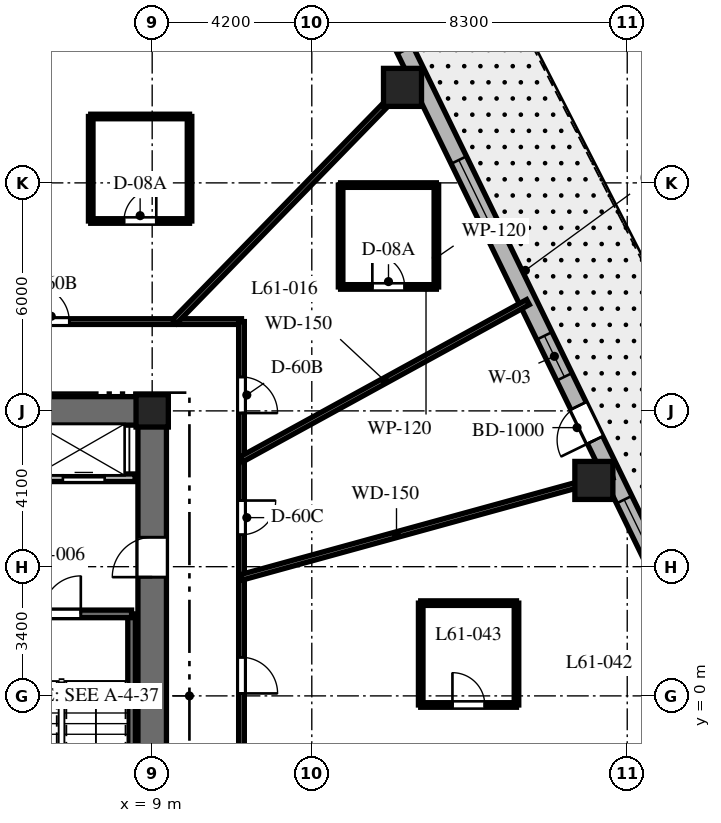
"""IFC4 building model, lengths in metres.
Left out: names, types, materials, properties, quantities, classifications, styles, units other than length and angle.
Written with IfcOpenShell. Run it as: python <this file> out.ifc"""

import sys

from ifc_helpers import new_model, si_unit, direction, frame, frame_2d, origin, origin_2d, place, context, subcontext, project, spatial, rectangle, extrude, element, fill, save


model = new_model("IFC4")
c1 = context("Model", 3, precision=1e-05, world=origin(), true_north=direction((0.0, 1.0)))
c2 = subcontext(c1, "Body", "Model", "MODEL_VIEW")
j1 = project(units=[si_unit("LENGTHUNIT", "METRE"), si_unit("PLANEANGLEUNIT", "RADIAN")], contexts=[c1])
p1 = place(None, origin())
s1 = spatial("IfcSite", under=j1, at=p1, CompositionType="ELEMENT")
p2 = place(p1, origin())
s2 = spatial("IfcBuilding", under=s1, at=p2, CompositionType="ELEMENT")
p3 = place(p2, frame((0.0, 0.0, 244.5)))
s3 = spatial("IfcBuildingStorey", under=s2, at=p3, CompositionType="ELEMENT", Elevation=244.5)
p4 = place(p3, frame((1.85, 7.5, 0.0), z_axis=(0.0, 0.0, 1.0), x_axis=(1.0, 0.0, 0.0)))
e1 = element("IfcWall", 1, at=p4, inside=s3, PredefinedType="SHEAR", context=c2, shape_type="SweptSolid", body=[
    extrude(rectangle(XDim=7.525, YDim=0.75, at=frame_2d((3.762, 0.0))), origin(), (0.0, 0.0, 1.0), 3.8),
])
p5 = place(p3, frame((9.0, -7.125, 0.0), z_axis=(0.0, 0.0, 1.0), x_axis=(0.0, 1.0, 0.0)))
e2 = element("IfcWall", 2, at=p5, inside=s3, PredefinedType="SHEAR", context=c2, shape_type="SweptSolid", body=[
    extrude(rectangle(XDim=14.25, YDim=0.75, at=frame_2d((7.125, 0.0))), origin(), (0.0, 0.0, 1.0), 3.8),
])
p6 = place(p5, frame((10.25, 0.0, 0.0)))
e3 = element("IfcOpeningElement", 3, at=p6, cuts=e2, PredefinedType="OPENING", context=c2, shape_type="SweptSolid", body=[
    extrude(rectangle(XDim=1.05, YDim=2.15, at=frame_2d((0.525, 1.075))), frame((0.0, 0.385, 0.0), z_axis=(0.0, -1.0, 0.0), x_axis=(1.0, 0.0, 0.0)), (0.0, 0.0, 1.0), 0.77),
])
p7 = place(p3, frame((8.458, -6.985, 0.0), z_axis=(0.0, 0.0, 1.0), x_axis=(0.0, 1.0, 0.0)))
e4 = element("IfcWall", 4, at=p7, inside=s3, PredefinedType="SHEAR", context=c2, shape_type="SweptSolid", body=[
    extrude(rectangle(XDim=9.143, YDim=0.2, at=frame_2d((4.572, 0.0))), origin(), (0.0, 0.0, 1.0), 3.8),
])
p8 = place(p3, frame((4.772, 2.158, 0.0), z_axis=(0.0, 0.0, 1.0), x_axis=(1.0, 0.0, 0.0)))
e5 = element("IfcWall", 5, at=p8, inside=s3, PredefinedType="SHEAR", context=c2, shape_type="SweptSolid", body=[
    extrude(rectangle(XDim=3.686, YDim=0.2, at=frame_2d((1.843, 0.0))), origin(), (0.0, 0.0, 1.0), 3.8),
])
p9 = place(p8, frame((1.35, 0.0, 0.0)))
e6 = element("IfcOpeningElement", 6, at=p9, cuts=e5, PredefinedType="OPENING", context=c2, shape_type="SweptSolid", body=[
    extrude(rectangle(XDim=1.0, YDim=2.15, at=frame_2d((0.5, 1.075))), frame((0.0, 0.11, 0.0), z_axis=(0.0, -1.0, 0.0), x_axis=(1.0, 0.0, 0.0)), (0.0, 0.0, 1.0), 0.22),
])
p10 = place(p3, frame((9.0, 7.5, 0.0), z_axis=(0.0, 0.0, 1.0), x_axis=(1.0, 0.0, 0.0)))
e7 = element("IfcColumn", 7, at=p10, inside=s3, PredefinedType="COLUMN", context=c2, shape_type="SweptSolid", body=[
    extrude(rectangle(XDim=0.85, YDim=0.85, at=origin_2d()), origin(), (0.0, 0.0, 1.0), 3.8),
])
for number, where, z_axis, x_axis in (
    (8, (20.622, 5.67, 0.0), (0.0, 0.0, 1.0), (1.0, 0.0, 0.0)),
    (9, (15.587, 16.013, 0.0), (0.0, 0.0, 1.0), (1.0, 0.0, 0.0)),
):
    element("IfcColumn", number, at=place(p3, frame(where, z_axis=z_axis, x_axis=x_axis)), inside=s3, PredefinedType="COLUMN", context=c2, shape_type="SweptSolid", body=[
        extrude(rectangle(XDim=1.0, YDim=1.0, at=origin_2d()), origin(), (0.0, 0.0, 1.0), 3.8),
    ])
p11 = place(p3, frame((16.324, -19.275, 0.0), z_axis=(0.0, 0.0, 1.0), x_axis=(0.325083142304, 0.945685439557, 0.0)))
e10 = element("IfcWall", 10, at=p11, inside=s3, PredefinedType="SOLIDWALL", context=c2, shape_type="SweptSolid", body=[
    extrude(rectangle(XDim=20.224, YDim=0.45, at=frame_2d((10.112, 0.0))), origin(), (0.0, 0.0, 1.0), 3.5),
])
p12 = place(p11, frame((1.253, 0.0, 0.8)))
e11 = element("IfcOpeningElement", 11, at=p12, cuts=e10, PredefinedType="OPENING", context=c2, shape_type="SweptSolid", body=[
    extrude(rectangle(XDim=1.5, YDim=1.8, at=frame_2d((0.75, 0.9))), frame((0.0, 0.235, 0.0), z_axis=(0.0, -1.0, 0.0), x_axis=(1.0, 0.0, 0.0)), (0.0, 0.0, 1.0), 0.47),
])
p13 = place(p11, frame((6.568, 0.0, 0.8)))
e12 = element("IfcOpeningElement", 12, at=p13, cuts=e10, PredefinedType="OPENING", context=c2, shape_type="SweptSolid", body=[
    extrude(rectangle(XDim=1.5, YDim=1.8, at=frame_2d((0.75, 0.9))), frame((0.0, 0.235, 0.0), z_axis=(0.0, -1.0, 0.0), x_axis=(1.0, 0.0, 0.0)), (0.0, 0.0, 1.0), 0.47),
])
p14 = place(p11, frame((12.25, 0.0, 0.8)))
e13 = element("IfcOpeningElement", 13, at=p14, cuts=e10, PredefinedType="OPENING", context=c2, shape_type="SweptSolid", body=[
    extrude(rectangle(XDim=1.5, YDim=1.8, at=frame_2d((0.75, 0.9))), frame((0.0, 0.235, 0.0), z_axis=(0.0, -1.0, 0.0), x_axis=(1.0, 0.0, 0.0)), (0.0, 0.0, 1.0), 0.47),
])
p15 = place(p11, frame((17.418, 0.0, 0.8)))
e14 = element("IfcOpeningElement", 14, at=p15, cuts=e10, PredefinedType="OPENING", context=c2, shape_type="SweptSolid", body=[
    extrude(rectangle(XDim=1.5, YDim=1.8, at=frame_2d((0.75, 0.9))), frame((0.0, 0.235, 0.0), z_axis=(0.0, -1.0, 0.0), x_axis=(1.0, 0.0, 0.0)), (0.0, 0.0, 1.0), 0.47),
])
p16 = place(p3, frame((22.74, 2.452, 0.0), z_axis=(0.0, 0.0, 1.0), x_axis=(-0.437753424814, 0.899095066755, 0.0)))
e15 = element("IfcWall", 15, at=p16, inside=s3, PredefinedType="SOLIDWALL", context=c2, shape_type="SweptSolid", body=[
    extrude(rectangle(XDim=19.137, YDim=0.45, at=frame_2d((9.569, 0.0))), origin(), (0.0, 0.0, 1.0), 3.5),
])
p17 = place(p16, frame((4.763, 0.0, 0.0)))
e16 = element("IfcOpeningElement", 16, at=p17, cuts=e15, PredefinedType="OPENING", context=c2, shape_type="SweptSolid", body=[
    extrude(rectangle(XDim=1.0, YDim=2.15, at=frame_2d((0.5, 1.075))), frame((0.0, 0.235, 0.0), z_axis=(0.0, -1.0, 0.0), x_axis=(1.0, 0.0, 0.0)), (0.0, 0.0, 1.0), 0.47),
])
p18 = place(p16, frame((6.611, 0.0, 0.8)))
e17 = element("IfcOpeningElement", 17, at=p18, cuts=e15, PredefinedType="OPENING", context=c2, shape_type="SweptSolid", body=[
    extrude(rectangle(XDim=1.2, YDim=1.8, at=frame_2d((0.6, 0.9))), frame((0.0, 0.235, 0.0), z_axis=(0.0, -1.0, 0.0), x_axis=(1.0, 0.0, 0.0)), (0.0, 0.0, 1.0), 0.47),
])
p19 = place(p16, frame((10.856, 0.0, 0.8)))
e18 = element("IfcOpeningElement", 18, at=p19, cuts=e15, PredefinedType="OPENING", context=c2, shape_type="SweptSolid", body=[
    extrude(rectangle(XDim=2.1, YDim=1.85, at=frame_2d((1.05, 0.925))), frame((0.0, 0.235, 0.0), z_axis=(0.0, -1.0, 0.0), x_axis=(1.0, 0.0, 0.0)), (0.0, 0.0, 1.0), 0.47),
])
p20 = place(p16, frame((16.173, 0.0, 0.8)))
e19 = element("IfcOpeningElement", 19, at=p20, cuts=e15, PredefinedType="OPENING", context=c2, shape_type="SweptSolid", body=[
    extrude(rectangle(XDim=2.1, YDim=1.85, at=frame_2d((1.05, 0.925))), frame((0.0, 0.235, 0.0), z_axis=(0.0, -1.0, 0.0), x_axis=(1.0, 0.0, 0.0)), (0.0, 0.0, 1.0), 0.47),
])
p21 = place(p16, frame((0.916, 0.0, 0.8)))
e20 = element("IfcOpeningElement", 20, at=p21, cuts=e15, PredefinedType="OPENING", context=c2, shape_type="SweptSolid", body=[
    extrude(rectangle(XDim=2.1, YDim=1.85, at=frame_2d((1.05, 0.925))), frame((0.0, 0.235, 0.0), z_axis=(0.0, -1.0, 0.0), x_axis=(1.0, 0.0, 0.0)), (0.0, 0.0, 1.0), 0.47),
])
p22 = place(p3, frame((4.5, 5.74, 0.0), z_axis=(0.0, 0.0, 1.0), x_axis=(1.0, 0.0, 0.0)))
e21 = element("IfcWall", 21, at=p22, inside=s3, PredefinedType="PARTITIONING", context=c2, shape_type="SweptSolid", body=[
    extrude(rectangle(XDim=4.05, YDim=0.2, at=frame_2d((2.025, 0.0))), origin(), (0.0, 0.0, 1.0), 3.5),
])
p23 = place(p22, frame((0.3, 0.0, 0.0)))
e22 = element("IfcOpeningElement", 22, at=p23, cuts=e21, PredefinedType="OPENING", context=c2, shape_type="SweptSolid", body=[
    extrude(rectangle(XDim=0.85, YDim=2.03, at=frame_2d((0.425, 1.015))), frame((0.0, 0.11, 0.0), z_axis=(0.0, -1.0, 0.0), x_axis=(1.0, 0.0, 0.0)), (0.0, 0.0, 1.0), 0.22),
])
p24 = place(p22, frame((2.15, 0.0, 0.0)))
e23 = element("IfcOpeningElement", 23, at=p24, cuts=e21, PredefinedType="OPENING", context=c2, shape_type="SweptSolid", body=[
    extrude(rectangle(XDim=1.1, YDim=2.2, at=frame_2d((0.55, 1.1))), frame((0.0, 0.11, 0.0), z_axis=(0.0, -1.0, 0.0), x_axis=(1.0, 0.0, 0.0)), (0.0, 0.0, 1.0), 0.22),
])
p25 = place(p3, frame((0.92, 9.85, 0.0), z_axis=(0.0, 0.0, 1.0), x_axis=(1.0, 0.0, 0.0)))
e24 = element("IfcWall", 24, at=p25, inside=s3, PredefinedType="PARTITIONING", context=c2, shape_type="SweptSolid", body=[
    extrude(rectangle(XDim=10.43, YDim=0.15, at=frame_2d((5.215, 0.0))), origin(), (0.0, 0.0, 1.0), 2.99),
])
p26 = place(p25, frame((4.949, 0.0, 0.0)))
e25 = element("IfcOpeningElement", 25, at=p26, cuts=e24, PredefinedType="OPENING", context=c2, shape_type="SweptSolid", body=[
    extrude(rectangle(XDim=0.95, YDim=2.03, at=frame_2d((0.475, 1.015))), frame((0.0, 0.085, 0.0), z_axis=(0.0, -1.0, 0.0), x_axis=(1.0, 0.0, 0.0)), (0.0, 0.0, 1.0), 0.17),
])
p27 = place(p3, frame((11.35, 9.85, 0.0), z_axis=(0.0, 0.0, 1.0), x_axis=(0.0, -1.0, 0.0)))
e26 = element("IfcWall", 26, at=p27, inside=s3, PredefinedType="PARTITIONING", context=c2, shape_type="SweptSolid", body=[
    extrude(rectangle(XDim=12.4, YDim=0.15, at=frame_2d((6.2, 0.0))), origin(), (0.0, 0.0, 1.0), 2.99),
])
p28 = place(p27, frame((4.709, 0.0, 0.0)))
e27 = element("IfcOpeningElement", 27, at=p28, cuts=e26, PredefinedType="OPENING", context=c2, shape_type="SweptSolid", body=[
    extrude(rectangle(XDim=0.9, YDim=2.03, at=frame_2d((0.45, 1.015))), frame((0.0, 0.085, 0.0), z_axis=(0.0, -1.0, 0.0), x_axis=(1.0, 0.0, 0.0)), (0.0, 0.0, 1.0), 0.17),
])
p29 = place(p27, frame((1.457, 0.0, 0.0)))
e28 = element("IfcOpeningElement", 28, at=p29, cuts=e26, PredefinedType="OPENING", context=c2, shape_type="SweptSolid", body=[
    extrude(rectangle(XDim=0.95, YDim=2.03, at=frame_2d((0.475, 1.015))), frame((0.0, 0.085, 0.0), z_axis=(0.0, -1.0, 0.0), x_axis=(1.0, 0.0, 0.0)), (0.0, 0.0, 1.0), 0.17),
])
p30 = place(p27, frame((8.835, 0.0, 0.0)))
e29 = element("IfcOpeningElement", 29, at=p30, cuts=e26, PredefinedType="OPENING", context=c2, shape_type="SweptSolid", body=[
    extrude(rectangle(XDim=0.95, YDim=2.03, at=frame_2d((0.475, 1.015))), frame((0.0, 0.085, 0.0), z_axis=(0.0, -1.0, 0.0), x_axis=(1.0, 0.0, 0.0)), (0.0, 0.0, 1.0), 0.17),
])
p31 = place(p3, frame((11.35, 3.121, 0.0), z_axis=(0.0, 0.0, 1.0), x_axis=(0.964212793822, 0.265129568758, 0.0)))
e30 = element("IfcWall", 30, at=p31, inside=s3, PredefinedType="PARTITIONING", context=c2, shape_type="SweptSolid", body=[
    extrude(rectangle(XDim=10.12, YDim=0.15, at=frame_2d((5.06, 0.0))), origin(), (0.0, 0.0, 1.0), 2.74),
])
p32 = place(p3, frame((11.35, 6.227, 0.0), z_axis=(0.0, 0.0, 1.0), x_axis=(0.876723190824, 0.480995266786, 0.0)))
e31 = element("IfcWall", 31, at=p32, inside=s3, PredefinedType="PARTITIONING", context=c2, shape_type="SweptSolid", body=[
    extrude(rectangle(XDim=8.598, YDim=0.15, at=frame_2d((4.299, 0.0))), origin(), (0.0, 0.0, 1.0), 2.74),
])
p33 = place(p3, frame((9.588, 9.85, 0.0), z_axis=(0.0, 0.0, 1.0), x_axis=(0.697519469595, 0.716565830567, 0.0)))
e32 = element("IfcWall", 32, at=p33, inside=s3, PredefinedType="PARTITIONING", context=c2, shape_type="SweptSolid", body=[
    extrude(rectangle(XDim=9.126, YDim=0.15, at=frame_2d((4.563, 0.0))), origin(), (0.0, 0.0, 1.0), 2.74),
])
p34 = place(p3, frame((3.004, 9.85, 0.0), z_axis=(0.0, 0.0, 1.0), x_axis=(0.291775760688, 0.956486751333, 0.0)))
e33 = element("IfcWall", 33, at=p34, inside=s3, PredefinedType="PARTITIONING", context=c2, shape_type="SweptSolid", body=[
    extrude(rectangle(XDim=12.258, YDim=0.15, at=frame_2d((6.129, 0.0))), origin(), (0.0, 0.0, 1.0), 2.74),
])
p35 = place(p3, frame((13.958, 10.762, 0.0), z_axis=(0.0, 0.0, 1.0), x_axis=(1.0, 0.0, 0.0)))
e34 = element("IfcWall", 34, at=p35, inside=s3, PredefinedType="PARTITIONING", context=c2, shape_type="SweptSolid", body=[
    extrude(rectangle(XDim=2.52, YDim=0.12, at=frame_2d((1.26, 0.0))), origin(), (0.0, 0.0, 1.0), 3.027),
])
p36 = place(p35, frame((0.835, 0.0, 0.0)))
e35 = element("IfcOpeningElement", 35, at=p36, cuts=e34, PredefinedType="OPENING", context=c2, shape_type="SweptSolid", body=[
    extrude(rectangle(XDim=0.85, YDim=2.03, at=frame_2d((0.425, 1.015))), frame((0.0, 0.07, 0.0), z_axis=(0.0, -1.0, 0.0), x_axis=(1.0, 0.0, 0.0)), (0.0, 0.0, 1.0), 0.14),
])
p37 = place(p3, frame((16.478, 10.762, 0.0), z_axis=(0.0, 0.0, 1.0), x_axis=(0.0, 1.0, 0.0)))
e36 = element("IfcWall", 36, at=p37, inside=s3, PredefinedType="PARTITIONING", context=c2, shape_type="SweptSolid", body=[
    extrude(rectangle(XDim=2.68, YDim=0.12, at=frame_2d((1.34, 0.0))), origin(), (0.0, 0.0, 1.0), 3.5),
])
p38 = place(p3, frame((16.478, 13.442, 0.0), z_axis=(0.0, 0.0, 1.0), x_axis=(-1.0, 0.0, 0.0)))
e37 = element("IfcWall", 37, at=p38, inside=s3, PredefinedType="PARTITIONING", context=c2, shape_type="SweptSolid", body=[
    extrude(rectangle(XDim=2.52, YDim=0.12, at=frame_2d((1.26, 0.0))), origin(), (0.0, 0.0, 1.0), 3.5),
])
p39 = place(p3, frame((13.958, 13.442, 0.0), z_axis=(0.0, 0.0, 1.0), x_axis=(0.0, -1.0, 0.0)))
e38 = element("IfcWall", 38, at=p39, inside=s3, PredefinedType="PARTITIONING", context=c2, shape_type="SweptSolid", body=[
    extrude(rectangle(XDim=2.68, YDim=0.12, at=frame_2d((1.34, 0.0))), origin(), (0.0, 0.0, 1.0), 3.027),
])
p40 = place(p3, frame((7.383, 12.497, 0.0), z_axis=(0.0, 0.0, 1.0), x_axis=(1.0, 0.0, 0.0)))
e39 = element("IfcWall", 39, at=p40, inside=s3, PredefinedType="PARTITIONING", context=c2, shape_type="SweptSolid", body=[
    extrude(rectangle(XDim=2.6, YDim=0.12, at=frame_2d((1.3, 0.0))), origin(), (0.0, 0.0, 1.0), 2.94),
])
p41 = place(p40, frame((0.875, 0.0, 0.0)))
e40 = element("IfcOpeningElement", 40, at=p41, cuts=e39, PredefinedType="OPENING", context=c2, shape_type="SweptSolid", body=[
    extrude(rectangle(XDim=0.85, YDim=2.03, at=frame_2d((0.425, 1.015))), frame((0.0, 0.07, 0.0), z_axis=(0.0, -1.0, 0.0), x_axis=(1.0, 0.0, 0.0)), (0.0, 0.0, 1.0), 0.14),
])
p42 = place(p3, frame((9.983, 12.497, 0.0), z_axis=(0.0, 0.0, 1.0), x_axis=(0.0, 1.0, 0.0)))
e41 = element("IfcWall", 41, at=p42, inside=s3, PredefinedType="PARTITIONING", context=c2, shape_type="SweptSolid", body=[
    extrude(rectangle(XDim=2.75, YDim=0.12, at=frame_2d((1.375, 0.0))), origin(), (0.0, 0.0, 1.0), 3.073),
])
p43 = place(p3, frame((9.983, 15.247, 0.0), z_axis=(0.0, 0.0, 1.0), x_axis=(-1.0, 0.0, 0.0)))
e42 = element("IfcWall", 42, at=p43, inside=s3, PredefinedType="PARTITIONING", context=c2, shape_type="SweptSolid", body=[
    extrude(rectangle(XDim=2.6, YDim=0.12, at=frame_2d((1.3, 0.0))), origin(), (0.0, 0.0, 1.0), 3.073),
])
p44 = place(p3, frame((7.383, 15.247, 0.0), z_axis=(0.0, 0.0, 1.0), x_axis=(0.0, -1.0, 0.0)))
e43 = element("IfcWall", 43, at=p44, inside=s3, PredefinedType="PARTITIONING", context=c2, shape_type="SweptSolid", body=[
    extrude(rectangle(XDim=2.75, YDim=0.12, at=frame_2d((1.375, 0.0))), origin(), (0.0, 0.0, 1.0), 2.94),
])
p45 = place(p3, frame((16.066, -0.239, 0.0), z_axis=(0.0, 0.0, 1.0), x_axis=(1.0, 0.0, 0.0)))
e44 = element("IfcWall", 44, at=p45, inside=s3, PredefinedType="PARTITIONING", context=c2, shape_type="SweptSolid", body=[
    extrude(rectangle(XDim=2.52, YDim=0.12, at=frame_2d((1.26, 0.0))), origin(), (0.0, 0.0, 1.0), 2.94),
])
p46 = place(p45, frame((0.835, 0.0, 0.0)))
e45 = element("IfcOpeningElement", 45, at=p46, cuts=e44, PredefinedType="OPENING", context=c2, shape_type="SweptSolid", body=[
    extrude(rectangle(XDim=0.85, YDim=2.03, at=frame_2d((0.425, 1.015))), frame((0.0, 0.07, 0.0), z_axis=(0.0, -1.0, 0.0), x_axis=(1.0, 0.0, 0.0)), (0.0, 0.0, 1.0), 0.14),
])
p47 = place(p3, frame((18.586, -0.239, 0.0), z_axis=(0.0, 0.0, 1.0), x_axis=(0.0, 1.0, 0.0)))
e46 = element("IfcWall", 46, at=p47, inside=s3, PredefinedType="PARTITIONING", context=c2, shape_type="SweptSolid", body=[
    extrude(rectangle(XDim=2.68, YDim=0.12, at=frame_2d((1.34, 0.0))), origin(), (0.0, 0.0, 1.0), 3.5),
])
p48 = place(p3, frame((18.586, 2.441, 0.0), z_axis=(0.0, 0.0, 1.0), x_axis=(-1.0, 0.0, 0.0)))
e47 = element("IfcWall", 47, at=p48, inside=s3, PredefinedType="PARTITIONING", context=c2, shape_type="SweptSolid", body=[
    extrude(rectangle(XDim=2.52, YDim=0.12, at=frame_2d((1.26, 0.0))), origin(), (0.0, 0.0, 1.0), 2.94),
])
p49 = place(p3, frame((16.066, 2.441, 0.0), z_axis=(0.0, 0.0, 1.0), x_axis=(0.0, -1.0, 0.0)))
e48 = element("IfcWall", 48, at=p49, inside=s3, PredefinedType="PARTITIONING", context=c2, shape_type="SweptSolid", body=[
    extrude(rectangle(XDim=2.68, YDim=0.12, at=frame_2d((1.34, 0.0))), origin(), (0.0, 0.0, 1.0), 3.5),
])
p50 = place(p17, origin())
e49 = element("IfcDoor", 49, at=p50, inside=s3, OperationType="SINGLE_SWING_LEFT", PredefinedType="DOOR", context=c2, shape_type="SweptSolid", body=[
    extrude(rectangle(XDim=1.0, YDim=2.15, at=frame_2d((0.5, 1.075))), frame((0.0, 0.025, 0.0), z_axis=(0.0, -1.0, 0.0), x_axis=(1.0, 0.0, 0.0)), (0.0, 0.0, 1.0), 0.05),
])
fill(e16, e49)
p51 = place(p18, origin())
e50 = element("IfcWindow", 50, at=p51, inside=s3, PartitioningType="SINGLE_PANEL", PredefinedType="WINDOW", context=c2, shape_type="SweptSolid", body=[
    extrude(rectangle(XDim=1.2, YDim=1.8, at=frame_2d((0.6, 0.9))), frame((0.0, 0.03, 0.0), z_axis=(0.0, -1.0, 0.0), x_axis=(1.0, 0.0, 0.0)), (0.0, 0.0, 1.0), 0.06),
])
fill(e17, e50)
p52 = place(p19, origin())
e51 = element("IfcWindow", 51, at=p52, inside=s3, PartitioningType="SINGLE_PANEL", PredefinedType="WINDOW", context=c2, shape_type="SweptSolid", body=[
    extrude(rectangle(XDim=2.1, YDim=1.85, at=frame_2d((1.05, 0.925))), frame((0.0, 0.03, 0.0), z_axis=(0.0, -1.0, 0.0), x_axis=(1.0, 0.0, 0.0)), (0.0, 0.0, 1.0), 0.06),
])
fill(e18, e51)
p53 = place(p21, origin())
e52 = element("IfcWindow", 52, at=p53, inside=s3, PartitioningType="SINGLE_PANEL", PredefinedType="WINDOW", context=c2, shape_type="SweptSolid", body=[
    extrude(rectangle(XDim=2.1, YDim=1.85, at=frame_2d((1.05, 0.925))), frame((0.0, 0.03, 0.0), z_axis=(0.0, -1.0, 0.0), x_axis=(1.0, 0.0, 0.0)), (0.0, 0.0, 1.0), 0.06),
])
fill(e20, e52)
p54 = place(p9, origin())
e53 = element("IfcDoor", 53, at=p54, inside=s3, OperationType="SINGLE_SWING_RIGHT", PredefinedType="DOOR", context=c2, shape_type="SweptSolid", body=[
    extrude(rectangle(XDim=1.0, YDim=2.15, at=frame_2d((0.5, 1.075))), frame((0.0, 0.025, 0.0), z_axis=(0.0, -1.0, 0.0), x_axis=(1.0, 0.0, 0.0)), (0.0, 0.0, 1.0), 0.05),
])
fill(e6, e53)
p55 = place(p6, origin())
e54 = element("IfcDoor", 54, at=p55, inside=s3, OperationType="SINGLE_SWING_LEFT", PredefinedType="DOOR", context=c2, shape_type="SweptSolid", body=[
    extrude(rectangle(XDim=1.05, YDim=2.15, at=frame_2d((0.525, 1.075))), frame((0.0, 0.025, 0.0), z_axis=(0.0, -1.0, 0.0), x_axis=(1.0, 0.0, 0.0)), (0.0, 0.0, 1.0), 0.05),
])
fill(e3, e54)
p56 = place(p24, origin())
e55 = element("IfcDoor", 55, at=p56, inside=s3, OperationType="SLIDING_TO_RIGHT", PredefinedType="DOOR", context=c2, shape_type="SweptSolid", body=[
    extrude(rectangle(XDim=1.1, YDim=2.2, at=frame_2d((0.55, 1.1))), frame((0.0, 0.025, 0.0), z_axis=(0.0, -1.0, 0.0), x_axis=(1.0, 0.0, 0.0)), (0.0, 0.0, 1.0), 0.05),
])
fill(e23, e55)
p57 = place(p28, origin())
e56 = element("IfcDoor", 56, at=p57, inside=s3, OperationType="SINGLE_SWING_LEFT", PredefinedType="DOOR", context=c2, shape_type="SweptSolid", body=[
    extrude(rectangle(XDim=0.9, YDim=2.03, at=frame_2d((0.45, 1.015))), frame((0.0, 0.025, 0.0), z_axis=(0.0, -1.0, 0.0), x_axis=(1.0, 0.0, 0.0)), (0.0, 0.0, 1.0), 0.05),
])
fill(e27, e56)
p58 = place(p29, origin())
e57 = element("IfcDoor", 57, at=p58, inside=s3, OperationType="SINGLE_SWING_RIGHT", PredefinedType="DOOR", context=c2, shape_type="SweptSolid", body=[
    extrude(rectangle(XDim=0.95, YDim=2.03, at=frame_2d((0.475, 1.015))), frame((0.0, 0.025, 0.0), z_axis=(0.0, -1.0, 0.0), x_axis=(1.0, 0.0, 0.0)), (0.0, 0.0, 1.0), 0.05),
])
fill(e28, e57)
p59 = place(p36, origin())
e58 = element("IfcDoor", 58, at=p59, inside=s3, OperationType="SINGLE_SWING_LEFT", PredefinedType="DOOR", context=c2, shape_type="SweptSolid", body=[
    extrude(rectangle(XDim=0.85, YDim=2.03, at=frame_2d((0.425, 1.015))), frame((0.0, 0.025, 0.0), z_axis=(0.0, -1.0, 0.0), x_axis=(1.0, 0.0, 0.0)), (0.0, 0.0, 1.0), 0.05),
])
fill(e35, e58)
p60 = place(p26, origin())
e59 = element("IfcDoor", 59, at=p60, inside=s3, OperationType="SINGLE_SWING_LEFT", PredefinedType="DOOR", context=c2, shape_type="SweptSolid", body=[
    extrude(rectangle(XDim=0.95, YDim=2.03, at=frame_2d((0.475, 1.015))), frame((0.0, 0.025, 0.0), z_axis=(0.0, -1.0, 0.0), x_axis=(1.0, 0.0, 0.0)), (0.0, 0.0, 1.0), 0.05),
])
fill(e25, e59)
p61 = place(p41, origin())
e60 = element("IfcDoor", 60, at=p61, inside=s3, OperationType="SINGLE_SWING_RIGHT", PredefinedType="DOOR", context=c2, shape_type="SweptSolid", body=[
    extrude(rectangle(XDim=0.85, YDim=2.03, at=frame_2d((0.425, 1.015))), frame((0.0, 0.025, 0.0), z_axis=(0.0, -1.0, 0.0), x_axis=(1.0, 0.0, 0.0)), (0.0, 0.0, 1.0), 0.05),
])
fill(e40, e60)
p62 = place(p30, origin())
e61 = element("IfcDoor", 61, at=p62, inside=s3, OperationType="SINGLE_SWING_RIGHT", PredefinedType="DOOR", context=c2, shape_type="SweptSolid", body=[
    extrude(rectangle(XDim=0.95, YDim=2.03, at=frame_2d((0.475, 1.015))), frame((0.0, 0.025, 0.0), z_axis=(0.0, -1.0, 0.0), x_axis=(1.0, 0.0, 0.0)), (0.0, 0.0, 1.0), 0.05),
])
fill(e29, e61)
p63 = place(p46, origin())
e62 = element("IfcDoor", 62, at=p63, inside=s3, OperationType="SINGLE_SWING_LEFT", PredefinedType="DOOR", context=c2, shape_type="SweptSolid", body=[
    extrude(rectangle(XDim=0.85, YDim=2.03, at=frame_2d((0.425, 1.015))), frame((0.0, 0.025, 0.0), z_axis=(0.0, -1.0, 0.0), x_axis=(1.0, 0.0, 0.0)), (0.0, 0.0, 1.0), 0.05),
])
fill(e45, e62)
save(model, sys.argv[1])
